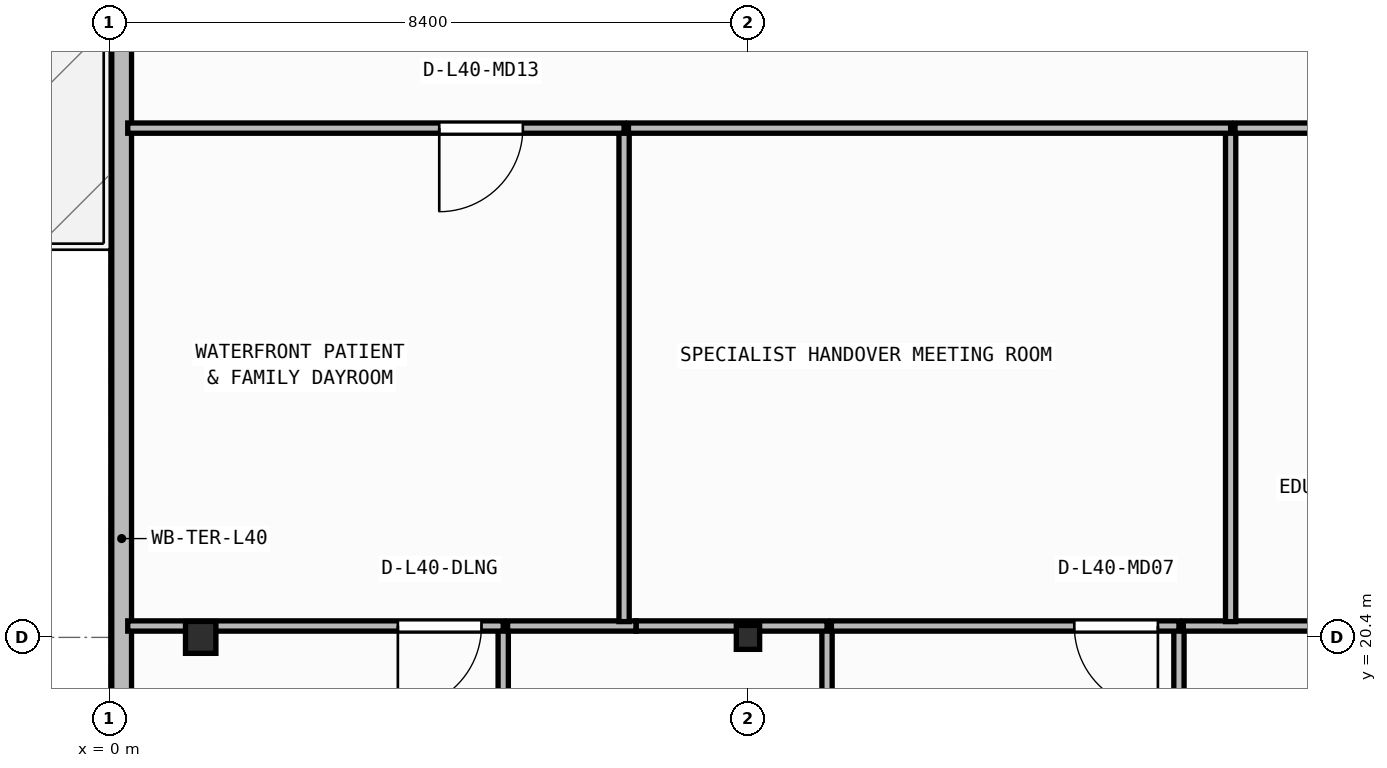
"""IFC4 building model, lengths in metres.
Left out: names, types, materials, properties, quantities, classifications, styles, units other than length and angle.
Written with IfcOpenShell. Run it as: python <this file> out.ifc"""

import sys

from ifc_helpers import new_model, si_unit, direction, frame, frame_2d, origin, origin_2d, place, context, subcontext, project, spatial, rectangle, i_section, extrude, element, fill, save


model = new_model("IFC4")
c1 = context("Model", 3, precision=1e-05, world=origin(), true_north=direction((0.0, 1.0)))
c2 = subcontext(c1, "Body", "Model", "MODEL_VIEW")
j1 = project(units=[si_unit("LENGTHUNIT", "METRE"), si_unit("PLANEANGLEUNIT", "RADIAN")], contexts=[c1])
p1 = place(None, origin())
s1 = spatial("IfcSite", under=j1, at=p1, CompositionType="ELEMENT")
p2 = place(p1, origin())
s2 = spatial("IfcBuilding", under=s1, at=p2, CompositionType="ELEMENT")
p3 = place(p2, frame((0.0, 0.0, 162.6)))
s3 = spatial("IfcBuildingStorey", under=s2, at=p3, CompositionType="ELEMENT", Elevation=162.6)
p4 = place(p3, frame((1.2, 20.4, 0.0), z_axis=(0.0, 0.0, 1.0), x_axis=(1.0, 0.0, 0.0)))
e1 = element("IfcColumn", 1, at=p4, inside=s3, PredefinedType="COLUMN", context=c2, shape_type="SweptSolid", body=[
    extrude(i_section(OverallWidth=0.4, OverallDepth=0.42, WebThickness=0.025, FlangeThickness=0.04, at=origin_2d()), origin(), (0.0, 0.0, 1.0), 3.95),
])
p5 = place(p3, frame((8.4, 20.4, 0.0), z_axis=(0.0, 0.0, 1.0), x_axis=(1.0, 0.0, 0.0)))
e2 = element("IfcColumn", 2, at=p5, inside=s3, PredefinedType="COLUMN", context=c2, shape_type="SweptSolid", body=[
    extrude(i_section(OverallWidth=0.307, OverallDepth=0.315, WebThickness=0.012, FlangeThickness=0.019, FilletRadius=0.017, at=origin_2d()), origin(), (0.0, 0.0, 1.0), 3.95),
])
p6 = place(p3, frame((0.16, 40.64, 0.0), z_axis=(0.0, 0.0, 1.0), x_axis=(0.0, -1.0, 0.0)))
e3 = element("IfcWall", 3, at=p6, inside=s3, PredefinedType="STANDARD", context=c2, shape_type="SweptSolid", body=[
    extrude(rectangle(XDim=37.88, YDim=0.26, at=frame_2d((18.94, 0.0))), origin(), (0.0, 0.0, 1.0), 3.71),
])
p7 = place(p6, frame((6.716, 0.0, 0.0)))
e4 = element("IfcOpeningElement", 4, at=p7, cuts=e3, PredefinedType="OPENING", context=c2, shape_type="SweptSolid", body=[
    extrude(rectangle(XDim=1.3, YDim=2.15, at=frame_2d((0.65, 1.075))), frame((0.0, 0.14, 0.0), z_axis=(0.0, -1.0, 0.0), x_axis=(1.0, 0.0, 0.0)), (0.0, 0.0, 1.0), 0.28),
])
p8 = place(p3, frame((5.18, 17.14, 0.0), z_axis=(0.0, 0.0, 1.0), x_axis=(0.0, 1.0, 0.0)))
e5 = element("IfcWall", 5, at=p8, inside=s3, PredefinedType="PARTITIONING", context=c2, shape_type="SweptSolid", body=[
    extrude(rectangle(XDim=3.41, YDim=0.135, at=frame_2d((1.705, 0.0))), origin(), (0.0, 0.0, 1.0), 3.71),
])
p9 = place(p3, frame((5.18, 20.55, 0.0), z_axis=(0.0, 0.0, 1.0), x_axis=(-1.0, 0.0, 0.0)))
e6 = element("IfcWall", 6, at=p9, inside=s3, PredefinedType="PARTITIONING", context=c2, shape_type="SweptSolid", body=[
    extrude(rectangle(XDim=4.94, YDim=0.135, at=frame_2d((2.47, 0.0))), origin(), (0.0, 0.0, 1.0), 3.083),
])
p10 = place(p9, frame((0.286, 0.0, 0.0)))
e7 = element("IfcOpeningElement", 7, at=p10, cuts=e6, PredefinedType="OPENING", context=c2, shape_type="SweptSolid", body=[
    extrude(rectangle(XDim=1.1, YDim=2.1, at=frame_2d((0.55, 1.05))), frame((0.0, 0.077, 0.0), z_axis=(0.0, -1.0, 0.0), x_axis=(1.0, 0.0, 0.0)), (0.0, 0.0, 1.0), 0.155),
])
p11 = place(p3, frame((9.44, 17.833, 0.0), z_axis=(0.0, 0.0, 1.0), x_axis=(0.0, 1.0, 0.0)))
e8 = element("IfcWall", 8, at=p11, inside=s3, PredefinedType="PARTITIONING", context=c2, shape_type="SweptSolid", body=[
    extrude(rectangle(XDim=2.718, YDim=0.135, at=frame_2d((1.359, 0.0))), origin(), (0.0, 0.0, 1.0), 3.71),
])
p12 = place(p3, frame((6.928, 20.55, 0.0), z_axis=(0.0, 0.0, 1.0), x_axis=(-1.0, 0.0, 0.0)))
e9 = element("IfcWall", 9, at=p12, inside=s3, PredefinedType="PARTITIONING", context=c2, shape_type="SweptSolid", body=[
    extrude(rectangle(XDim=1.691, YDim=0.135, at=frame_2d((0.845, 0.0))), origin(), (0.0, 0.0, 1.0), 3.083),
])
p13 = place(p3, frame((9.44, 20.55, 0.0), z_axis=(0.0, 0.0, 1.0), x_axis=(-1.0, 0.0, 0.0)))
e10 = element("IfcWall", 10, at=p13, inside=s3, PredefinedType="PARTITIONING", context=c2, shape_type="SweptSolid", body=[
    extrude(rectangle(XDim=2.51, YDim=0.135, at=frame_2d((1.255, 0.0))), origin(), (0.0, 0.0, 1.0), 3.083),
])
p14 = place(p3, frame((14.07, 17.833, 0.0), z_axis=(0.0, 0.0, 1.0), x_axis=(0.0, 1.0, 0.0)))
e11 = element("IfcWall", 11, at=p14, inside=s3, PredefinedType="PARTITIONING", context=c2, shape_type="SweptSolid", body=[
    extrude(rectangle(XDim=2.718, YDim=0.135, at=frame_2d((1.359, 0.0))), origin(), (0.0, 0.0, 1.0), 3.71),
])
p15 = place(p3, frame((14.07, 20.55, 0.0), z_axis=(0.0, 0.0, 1.0), x_axis=(-1.0, 0.0, 0.0)))
e12 = element("IfcWall", 12, at=p15, inside=s3, PredefinedType="PARTITIONING", context=c2, shape_type="SweptSolid", body=[
    extrude(rectangle(XDim=4.573, YDim=0.135, at=frame_2d((2.286, 0.0))), origin(), (0.0, 0.0, 1.0), 3.083),
])
p16 = place(p15, frame((0.277, 0.0, 0.0)))
e13 = element("IfcOpeningElement", 13, at=p16, cuts=e12, PredefinedType="OPENING", context=c2, shape_type="SweptSolid", body=[
    extrude(rectangle(XDim=1.1, YDim=2.1, at=frame_2d((0.55, 1.05))), frame((0.0, 0.077, 0.0), z_axis=(0.0, -1.0, 0.0), x_axis=(1.0, 0.0, 0.0)), (0.0, 0.0, 1.0), 0.155),
])
p17 = place(p3, frame((19.12, 20.55, 0.0), z_axis=(0.0, 0.0, 1.0), x_axis=(-1.0, 0.0, 0.0)))
e14 = element("IfcWall", 14, at=p17, inside=s3, PredefinedType="PARTITIONING", context=c2, shape_type="SweptSolid", body=[
    extrude(rectangle(XDim=4.993, YDim=0.135, at=frame_2d((2.496, 0.0))), origin(), (0.0, 0.0, 1.0), 3.083),
])
p18 = place(p3, frame((6.77, 20.607, 0.0), z_axis=(0.0, 0.0, 1.0), x_axis=(0.0, 1.0, 0.0)))
e15 = element("IfcWall", 15, at=p18, inside=s3, PredefinedType="PARTITIONING", context=c2, shape_type="SweptSolid", body=[
    extrude(rectangle(XDim=6.493, YDim=0.135, at=frame_2d((3.246, 0.0))), origin(), (0.0, 0.0, 1.0), 3.71),
])
p19 = place(p3, frame((6.77, 27.1, 0.0), z_axis=(0.0, 0.0, 1.0), x_axis=(-1.0, 0.0, 0.0)))
e16 = element("IfcWall", 16, at=p19, inside=s3, PredefinedType="PARTITIONING", context=c2, shape_type="SweptSolid", body=[
    extrude(rectangle(XDim=6.53, YDim=0.135, at=frame_2d((3.265, 0.0))), origin(), (0.0, 0.0, 1.0), 3.71),
])
p20 = place(p19, frame((1.332, 0.0, 0.0)))
e17 = element("IfcOpeningElement", 17, at=p20, cuts=e16, PredefinedType="OPENING", context=c2, shape_type="SweptSolid", body=[
    extrude(rectangle(XDim=1.1, YDim=2.1, at=frame_2d((0.55, 1.05))), frame((0.0, 0.077, 0.0), z_axis=(0.0, -1.0, 0.0), x_axis=(1.0, 0.0, 0.0)), (0.0, 0.0, 1.0), 0.155),
])
p21 = place(p3, frame((14.75, 20.607, 0.0), z_axis=(0.0, 0.0, 1.0), x_axis=(0.0, 1.0, 0.0)))
e18 = element("IfcWall", 18, at=p21, inside=s3, PredefinedType="PARTITIONING", context=c2, shape_type="SweptSolid", body=[
    extrude(rectangle(XDim=6.493, YDim=0.135, at=frame_2d((3.246, 0.0))), origin(), (0.0, 0.0, 1.0), 3.71),
])
p22 = place(p3, frame((14.75, 27.1, 0.0), z_axis=(0.0, 0.0, 1.0), x_axis=(-1.0, 0.0, 0.0)))
e19 = element("IfcWall", 19, at=p22, inside=s3, PredefinedType="PARTITIONING", context=c2, shape_type="SweptSolid", body=[
    extrude(rectangle(XDim=7.923, YDim=0.135, at=frame_2d((3.961, 0.0))), origin(), (0.0, 0.0, 1.0), 3.71),
])
p23 = place(p3, frame((16.448, 27.1, 0.0), z_axis=(0.0, 0.0, 1.0), x_axis=(-1.0, 0.0, 0.0)))
e20 = element("IfcWall", 20, at=p23, inside=s3, PredefinedType="PARTITIONING", context=c2, shape_type="SweptSolid", body=[
    extrude(rectangle(XDim=1.641, YDim=0.135, at=frame_2d((0.82, 0.0))), origin(), (0.0, 0.0, 1.0), 3.71),
])
p24 = place(p10, origin())
e21 = element("IfcDoor", 21, at=p24, inside=s3, OperationType="SINGLE_SWING_RIGHT", PredefinedType="DOOR", context=c2, shape_type="SweptSolid", body=[
    extrude(rectangle(XDim=1.1, YDim=2.1, at=frame_2d((0.55, 1.05))), frame((0.0, 0.025, 0.0), z_axis=(0.0, -1.0, 0.0), x_axis=(1.0, 0.0, 0.0)), (0.0, 0.0, 1.0), 0.05),
])
fill(e7, e21)
p25 = place(p16, origin())
e22 = element("IfcDoor", 22, at=p25, inside=s3, OperationType="SINGLE_SWING_LEFT", PredefinedType="DOOR", context=c2, shape_type="SweptSolid", body=[
    extrude(rectangle(XDim=1.1, YDim=2.1, at=frame_2d((0.55, 1.05))), frame((0.0, 0.025, 0.0), z_axis=(0.0, -1.0, 0.0), x_axis=(1.0, 0.0, 0.0)), (0.0, 0.0, 1.0), 0.05),
])
fill(e13, e22)
p26 = place(p20, origin())
e23 = element("IfcDoor", 23, at=p26, inside=s3, OperationType="SINGLE_SWING_RIGHT", PredefinedType="DOOR", context=c2, shape_type="SweptSolid", body=[
    extrude(rectangle(XDim=1.1, YDim=2.1, at=frame_2d((0.55, 1.05))), frame((0.0, 0.025, 0.0), z_axis=(0.0, -1.0, 0.0), x_axis=(1.0, 0.0, 0.0)), (0.0, 0.0, 1.0), 0.05),
])
fill(e17, e23)
save(model, sys.argv[1])
